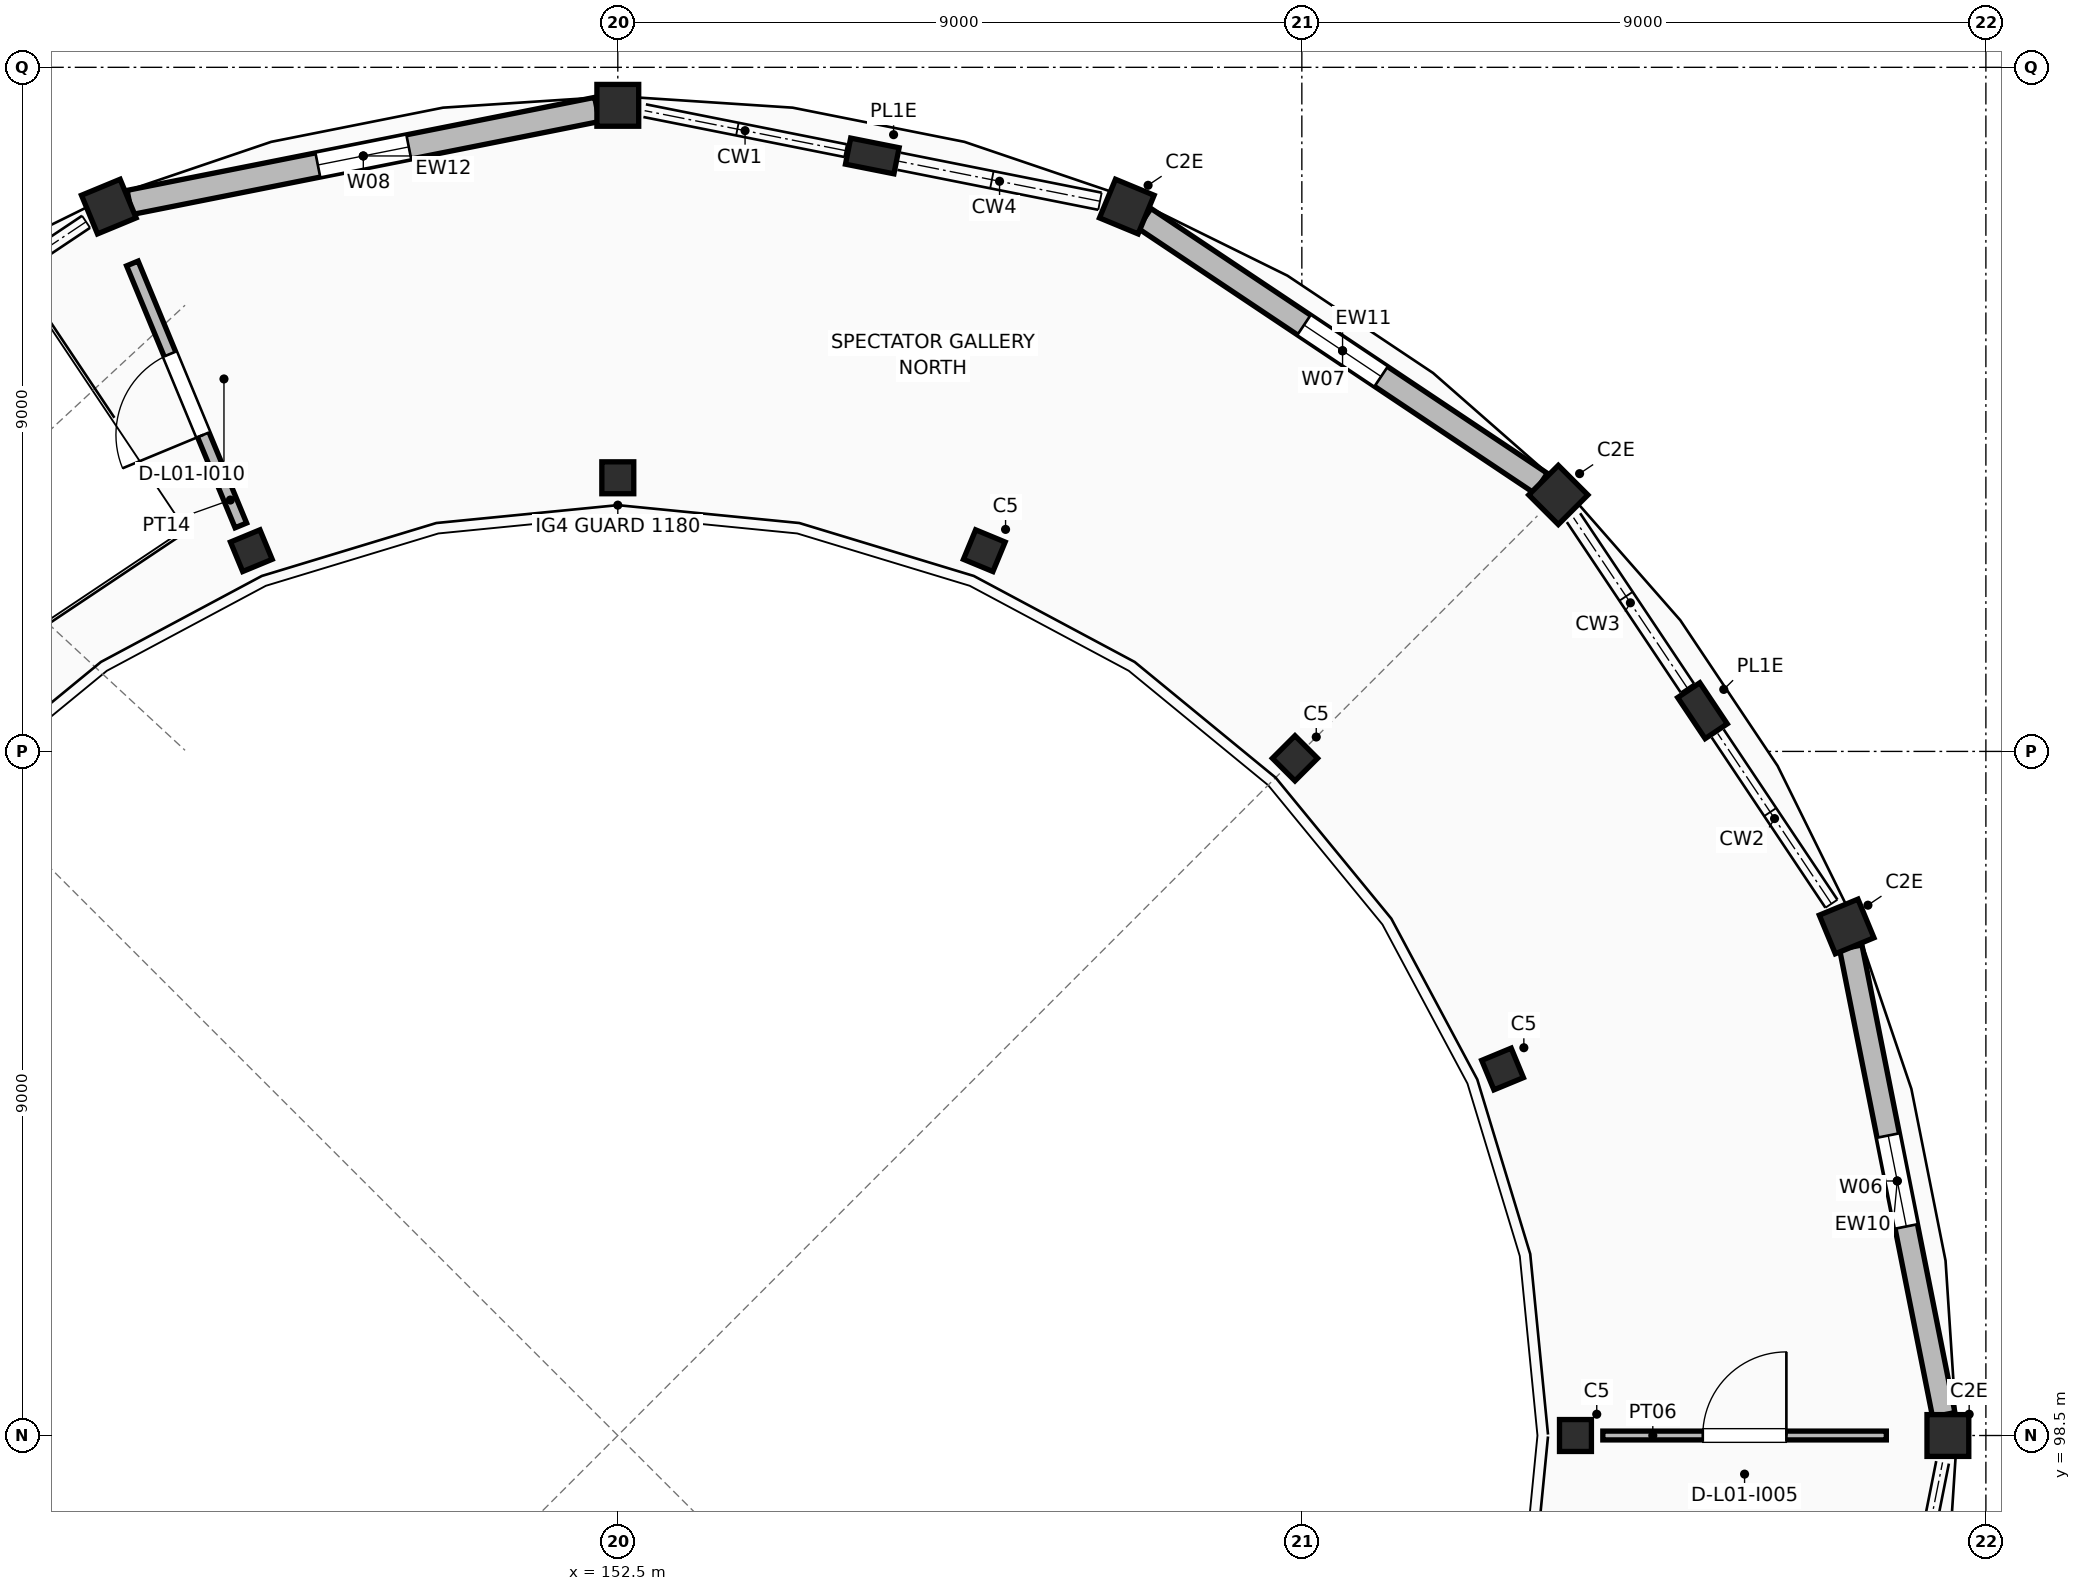
"""IFC4 building model, lengths in metres.
Left out: names, types, materials, properties, quantities, classifications, styles, units other than length and angle.
Written with IfcOpenShell. Run it as: python <this file> out.ifc"""

import sys

from ifc_helpers import new_model, si_unit, direction, frame, frame_2d, origin, origin_2d, place, context, subcontext, project, spatial, rectangle, extrude, element, fill, save


model = new_model("IFC4")
c1 = context("Model", 3, precision=1e-05, world=origin(), true_north=direction((0.0, 1.0)))
c2 = subcontext(c1, "Body", "Model", "MODEL_VIEW")
j1 = project(units=[si_unit("LENGTHUNIT", "METRE"), si_unit("PLANEANGLEUNIT", "RADIAN")], contexts=[c1])
p1 = place(None, origin())
s1 = spatial("IfcSite", under=j1, at=p1, CompositionType="ELEMENT")
p2 = place(p1, origin())
s2 = spatial("IfcBuilding", under=s1, at=p2, CompositionType="ELEMENT")
p3 = place(p2, frame((0.0, 0.0, 4.42)))
s3 = spatial("IfcBuildingStorey", under=s2, at=p3, CompositionType="ELEMENT", Elevation=4.42)
p4 = place(p3, frame((165.1, 98.5, 0.0), z_axis=(0.0, 0.0, 1.0), x_axis=(1.0, 0.0, 0.0)))
e1 = element("IfcColumn", 1, at=p4, inside=s3, PredefinedType="COLUMN", context=c2, shape_type="SweptSolid", body=[
    extrude(rectangle(XDim=0.42, YDim=0.42, at=origin_2d()), origin(), (0.0, 0.0, 1.0), 3.74),
])
p5 = place(p3, frame((170.0, 98.5, 0.0), z_axis=(0.0, 0.0, 1.0), x_axis=(1.0, 0.0, 0.0)))
e2 = element("IfcColumn", 2, at=p5, inside=s3, PredefinedType="COLUMN", context=c2, shape_type="SweptSolid", body=[
    extrude(rectangle(XDim=0.55, YDim=0.55, at=origin_2d()), origin(), (0.0, 0.0, 1.0), 3.74),
])
p6 = place(p3, frame((164.141, 103.322, 0.0), z_axis=(0.0, 0.0, 1.0), x_axis=(0.923879532511, 0.382683432365, 0.0)))
e3 = element("IfcColumn", 3, at=p6, inside=s3, PredefinedType="COLUMN", context=c2, shape_type="SweptSolid", body=[
    extrude(rectangle(XDim=0.42, YDim=0.42, at=origin_2d()), origin(), (0.0, 0.0, 1.0), 3.74),
])
p7 = place(p3, frame((168.668, 105.197, 0.0), z_axis=(0.0, 0.0, 1.0), x_axis=(0.923879532511, 0.382683432365, 0.0)))
e4 = element("IfcColumn", 4, at=p7, inside=s3, PredefinedType="COLUMN", context=c2, shape_type="SweptSolid", body=[
    extrude(rectangle(XDim=0.55, YDim=0.55, at=origin_2d()), origin(), (0.0, 0.0, 1.0), 3.74),
])
p8 = place(p3, frame((161.409, 107.409, 0.0), z_axis=(0.0, 0.0, 1.0), x_axis=(0.707106781187, 0.707106781187, 0.0)))
e5 = element("IfcColumn", 5, at=p8, inside=s3, PredefinedType="COLUMN", context=c2, shape_type="SweptSolid", body=[
    extrude(rectangle(XDim=0.42, YDim=0.42, at=origin_2d()), origin(), (0.0, 0.0, 1.0), 3.74),
])
p9 = place(p3, frame((164.874, 110.874, 0.0), z_axis=(0.0, 0.0, 1.0), x_axis=(0.707106781187, 0.707106781187, 0.0)))
e6 = element("IfcColumn", 6, at=p9, inside=s3, PredefinedType="COLUMN", context=c2, shape_type="SweptSolid", body=[
    extrude(rectangle(XDim=0.55, YDim=0.55, at=origin_2d()), origin(), (0.0, 0.0, 1.0), 3.74),
])
p10 = place(p3, frame((157.322, 110.141, 0.0), z_axis=(0.0, 0.0, 1.0), x_axis=(0.382683432365, 0.923879532511, 0.0)))
e7 = element("IfcColumn", 7, at=p10, inside=s3, PredefinedType="COLUMN", context=c2, shape_type="SweptSolid", body=[
    extrude(rectangle(XDim=0.42, YDim=0.42, at=origin_2d()), origin(), (0.0, 0.0, 1.0), 3.74),
])
p11 = place(p3, frame((159.197, 114.668, 0.0), z_axis=(0.0, 0.0, 1.0), x_axis=(0.382683432365, 0.923879532511, 0.0)))
e8 = element("IfcColumn", 8, at=p11, inside=s3, PredefinedType="COLUMN", context=c2, shape_type="SweptSolid", body=[
    extrude(rectangle(XDim=0.55, YDim=0.55, at=origin_2d()), origin(), (0.0, 0.0, 1.0), 3.74),
])
p12 = place(p3, frame((152.5, 111.1, 0.0), z_axis=(0.0, 0.0, 1.0), x_axis=(0.0, 1.0, 0.0)))
e9 = element("IfcColumn", 9, at=p12, inside=s3, PredefinedType="COLUMN", context=c2, shape_type="SweptSolid", body=[
    extrude(rectangle(XDim=0.42, YDim=0.42, at=origin_2d()), origin(), (0.0, 0.0, 1.0), 3.74),
])
p13 = place(p3, frame((152.5, 116.0, 0.0), z_axis=(0.0, 0.0, 1.0), x_axis=(0.0, 1.0, 0.0)))
e10 = element("IfcColumn", 10, at=p13, inside=s3, PredefinedType="COLUMN", context=c2, shape_type="SweptSolid", body=[
    extrude(rectangle(XDim=0.55, YDim=0.55, at=origin_2d()), origin(), (0.0, 0.0, 1.0), 3.74),
])
p14 = place(p3, frame((147.678, 110.141, 0.0), z_axis=(0.0, 0.0, 1.0), x_axis=(-0.382683432365, 0.923879532511, 0.0)))
e11 = element("IfcColumn", 11, at=p14, inside=s3, PredefinedType="COLUMN", context=c2, shape_type="SweptSolid", body=[
    extrude(rectangle(XDim=0.42, YDim=0.42, at=origin_2d()), origin(), (0.0, 0.0, 1.0), 3.74),
])
p15 = place(p3, frame((145.803, 114.668, 0.0), z_axis=(0.0, 0.0, 1.0), x_axis=(-0.382683432365, 0.923879532511, 0.0)))
e12 = element("IfcColumn", 12, at=p15, inside=s3, PredefinedType="COLUMN", context=c2, shape_type="SweptSolid", body=[
    extrude(rectangle(XDim=0.55, YDim=0.55, at=origin_2d()), origin(), (0.0, 0.0, 1.0), 3.74),
])
for number, where, z_axis, x_axis in (
    (13, (166.771, 108.036, 0.0), (0.0, 0.0, 1.0), (0.831, 0.556, 0.0)),
    (14, (155.848, 115.334, 0.0), (0.0, 0.0, 1.0), (0.195, 0.981, 0.0)),
):
    element("IfcColumn", number, at=place(p3, frame(where, z_axis=z_axis, x_axis=x_axis)), inside=s3, PredefinedType="PILASTER", context=c2, shape_type="SweptSolid", body=[
        extrude(rectangle(XDim=0.35, YDim=0.65, at=origin_2d()), origin(), (0.0, 0.0, 1.0), 3.74),
    ])
p16 = place(p3, frame((169.946, 98.773, 0.0), z_axis=(0.0, 0.0, 1.0), x_axis=(-0.195090512195, 0.980785242574, 0.0)))
e15 = element("IfcWall", 15, at=p16, inside=s3, PredefinedType="STANDARD", context=c2, shape_type="SweptSolid", body=[
    extrude(rectangle(XDim=6.272, YDim=0.3, at=frame_2d((3.136, 0.0))), origin(), (0.0, 0.0, 1.0), 2.78),
])
p17 = place(p16, frame((2.526, 0.0, 0.95)))
e16 = element("IfcOpeningElement", 16, at=p17, cuts=e15, PredefinedType="OPENING", context=c2, shape_type="SweptSolid", body=[
    extrude(rectangle(XDim=1.22, YDim=1.3, at=frame_2d((0.61, 0.65))), frame((0.0, 0.16, 0.0), z_axis=(0.0, -1.0, 0.0), x_axis=(1.0, 0.0, 0.0)), (0.0, 0.0, 1.0), 0.32),
])
p18 = place(p3, frame((164.643, 111.029, 0.0), z_axis=(0.0, 0.0, 1.0), x_axis=(-0.831468962917, 0.555571204893, 0.0)))
e17 = element("IfcWall", 17, at=p18, inside=s3, PredefinedType="STANDARD", context=c2, shape_type="SweptSolid", body=[
    extrude(rectangle(XDim=6.272, YDim=0.312, at=frame_2d((3.136, 0.0))), origin(), (0.0, 0.0, 1.0), 2.78),
])
p19 = place(p18, frame((2.526, 0.0, 0.95)))
e18 = element("IfcOpeningElement", 18, at=p19, cuts=e17, PredefinedType="OPENING", context=c2, shape_type="SweptSolid", body=[
    extrude(rectangle(XDim=1.22, YDim=1.45, at=frame_2d((0.61, 0.725))), frame((0.0, 0.166, 0.0), z_axis=(0.0, -1.0, 0.0), x_axis=(1.0, 0.0, 0.0)), (0.0, 0.0, 1.0), 0.332),
])
p20 = place(p3, frame((152.227, 115.946, 0.0), z_axis=(0.0, 0.0, 1.0), x_axis=(-0.980785242574, -0.195090512195, 0.0)))
e19 = element("IfcWall", 19, at=p20, inside=s3, PredefinedType="STANDARD", context=c2, shape_type="SweptSolid", body=[
    extrude(rectangle(XDim=6.272, YDim=0.324, at=frame_2d((3.136, 0.0))), origin(), (0.0, 0.0, 1.0), 2.78),
])
p21 = place(p20, frame((2.526, 0.0, 0.95)))
e20 = element("IfcOpeningElement", 20, at=p21, cuts=e19, PredefinedType="OPENING", context=c2, shape_type="SweptSolid", body=[
    extrude(rectangle(XDim=1.22, YDim=1.6, at=frame_2d((0.61, 0.8))), frame((0.0, 0.172, 0.0), z_axis=(0.0, -1.0, 0.0), x_axis=(1.0, 0.0, 0.0)), (0.0, 0.0, 1.0), 0.344),
])
p22 = place(p3, frame((165.46, 98.5, 0.0), z_axis=(0.0, 0.0, 1.0), x_axis=(1.0, 0.0, 0.0)))
e21 = element("IfcWall", 21, at=p22, inside=s3, PredefinedType="PARTITIONING", context=c2, shape_type="SweptSolid", body=[
    extrude(rectangle(XDim=3.73, YDim=0.116, at=frame_2d((1.865, 0.0))), origin(), (0.0, 0.0, 1.0), 2.75),
])
p23 = place(p22, frame((1.315, 0.0, 0.0)))
e22 = element("IfcOpeningElement", 22, at=p23, cuts=e21, PredefinedType="OPENING", context=c2, shape_type="SweptSolid", body=[
    extrude(rectangle(XDim=1.1, YDim=2.12, at=frame_2d((0.55, 1.06))), frame((0.0, 0.068, 0.0), z_axis=(0.0, -1.0, 0.0), x_axis=(1.0, 0.0, 0.0)), (0.0, 0.0, 1.0), 0.136),
])
p24 = place(p3, frame((147.541, 110.473, 0.0), z_axis=(0.0, 0.0, 1.0), x_axis=(-0.38270441435, 0.923870841209, 0.0)))
e23 = element("IfcWall", 23, at=p24, inside=s3, PredefinedType="PARTITIONING", context=c2, shape_type="SweptSolid", body=[
    extrude(rectangle(XDim=3.73, YDim=0.164, at=frame_2d((1.865, 0.0))), origin(), (0.0, 0.0, 1.0), 2.75),
])
p25 = place(p24, frame((1.29, 0.0, 0.0)))
e24 = element("IfcOpeningElement", 24, at=p25, cuts=e23, PredefinedType="OPENING", context=c2, shape_type="SweptSolid", body=[
    extrude(rectangle(XDim=1.15, YDim=2.18, at=frame_2d((0.575, 1.09))), frame((0.0, 0.092, 0.0), z_axis=(0.0, -1.0, 0.0), x_axis=(1.0, 0.0, 0.0)), (0.0, 0.0, 1.0), 0.184),
])
p26 = place(p17, origin())
e25 = element("IfcWindow", 25, at=p26, inside=s3, PartitioningType="SINGLE_PANEL", PredefinedType="WINDOW", context=c2, shape_type="SweptSolid", body=[
    extrude(rectangle(XDim=1.22, YDim=1.3, at=frame_2d((0.61, 0.65))), frame((0.0, 0.03, 0.0), z_axis=(0.0, -1.0, 0.0), x_axis=(1.0, 0.0, 0.0)), (0.0, 0.0, 1.0), 0.06),
])
fill(e16, e25)
p27 = place(p19, origin())
e26 = element("IfcWindow", 26, at=p27, inside=s3, PartitioningType="SINGLE_PANEL", PredefinedType="WINDOW", context=c2, shape_type="SweptSolid", body=[
    extrude(rectangle(XDim=1.22, YDim=1.45, at=frame_2d((0.61, 0.725))), frame((0.0, 0.03, 0.0), z_axis=(0.0, -1.0, 0.0), x_axis=(1.0, 0.0, 0.0)), (0.0, 0.0, 1.0), 0.06),
])
fill(e18, e26)
p28 = place(p21, origin())
e27 = element("IfcWindow", 27, at=p28, inside=s3, PartitioningType="SINGLE_PANEL", PredefinedType="WINDOW", context=c2, shape_type="SweptSolid", body=[
    extrude(rectangle(XDim=1.22, YDim=1.6, at=frame_2d((0.61, 0.8))), frame((0.0, 0.03, 0.0), z_axis=(0.0, -1.0, 0.0), x_axis=(1.0, 0.0, 0.0)), (0.0, 0.0, 1.0), 0.06),
])
fill(e20, e27)
p29 = place(p23, frame((1.1, 0.0, 0.0), z_axis=(0.0, 0.0, 1.0), x_axis=(-1.0, 0.0, 0.0)))
e28 = element("IfcDoor", 28, at=p29, inside=s3, OperationType="SINGLE_SWING_RIGHT", PredefinedType="DOOR", context=c2, shape_type="SweptSolid", body=[
    extrude(rectangle(XDim=1.1, YDim=2.12, at=frame_2d((0.55, 1.06))), frame((0.0, 0.025, 0.0), z_axis=(0.0, -1.0, 0.0), x_axis=(1.0, 0.0, 0.0)), (0.0, 0.0, 1.0), 0.05),
])
fill(e22, e28)
p30 = place(p25, origin())
e29 = element("IfcDoor", 29, at=p30, inside=s3, OperationType="SINGLE_SWING_LEFT", PredefinedType="DOOR", context=c2, shape_type="SweptSolid", body=[
    extrude(rectangle(XDim=1.15, YDim=2.18, at=frame_2d((0.575, 1.09))), frame((0.0, 0.025, 0.0), z_axis=(0.0, -1.0, 0.0), x_axis=(1.0, 0.0, 0.0)), (0.0, 0.0, 1.0), 0.05),
])
fill(e24, e29)
save(model, sys.argv[1])
